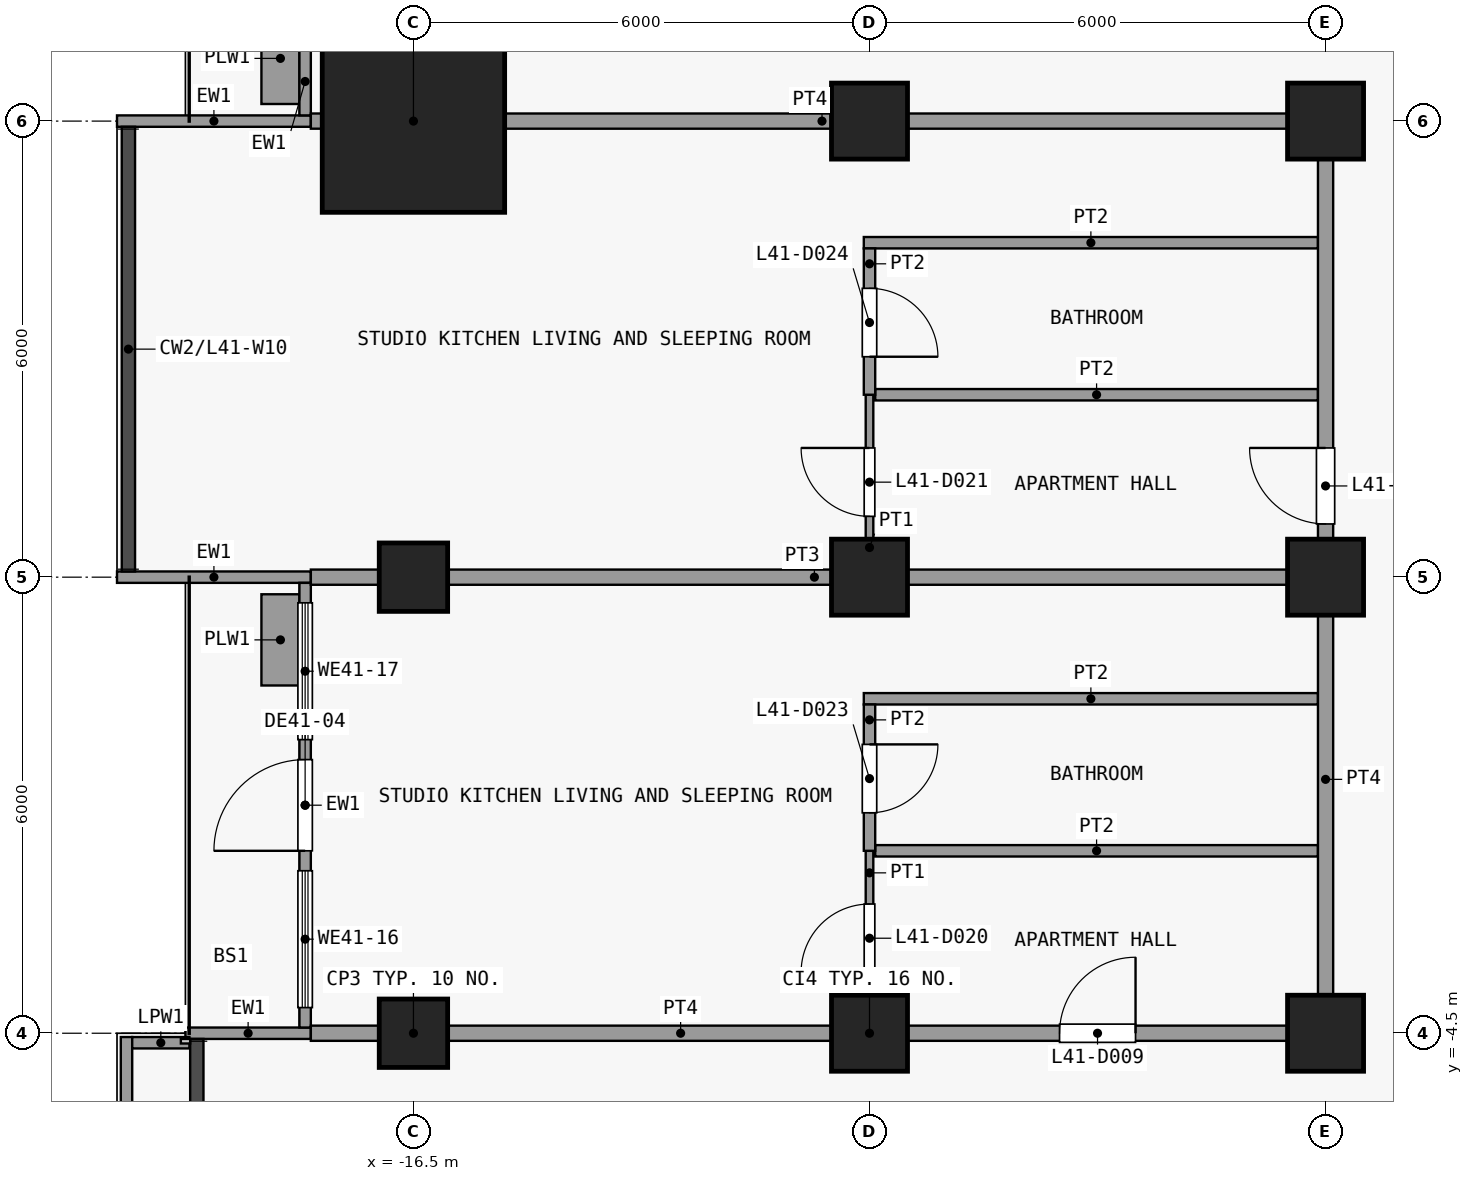
"""IFC4 building model, lengths in metres.
Left out: names, types, materials, properties, quantities, classifications, styles, units other than length and angle.
Written with IfcOpenShell. Run it as: python <this file> out.ifc"""

import sys

from ifc_helpers import new_model, si_unit, direction, frame, frame_2d, origin, origin_2d, place, context, subcontext, project, spatial, rectangle, extrude, element, fill, save


model = new_model("IFC4")
c1 = context("Model", 3, precision=1e-05, world=origin(), true_north=direction((0.0, 1.0)))
c2 = subcontext(c1, "Body", "Model", "MODEL_VIEW")
j1 = project(units=[si_unit("LENGTHUNIT", "METRE"), si_unit("PLANEANGLEUNIT", "RADIAN")], contexts=[c1])
p1 = place(None, origin())
s1 = spatial("IfcSite", under=j1, at=p1, CompositionType="ELEMENT")
p2 = place(p1, origin())
s2 = spatial("IfcBuilding", under=s1, at=p2, CompositionType="ELEMENT")
p3 = place(p2, frame((0.0, 0.0, 167.3)))
s3 = spatial("IfcBuildingStorey", under=s2, at=p3, CompositionType="ELEMENT", Elevation=167.3)
for number, where, z_axis, x_axis in (
    (1, (-16.5, -4.5, 0.0), (0.0, 0.0, 1.0), (1.0, 0.0, 0.0)),
    (2, (-16.5, 1.5, 0.0), (0.0, 0.0, 1.0), (1.0, 0.0, 0.0)),
):
    element("IfcColumn", number, at=place(p3, frame(where, z_axis=z_axis, x_axis=x_axis)), inside=s3, PredefinedType="COLUMN", context=c2, shape_type="SweptSolid", body=[
        extrude(rectangle(XDim=0.9, YDim=0.9, at=origin_2d()), origin(), (0.0, 0.0, 1.0), 3.6),
    ])
p4 = place(p3, frame((-16.5, 7.5, 0.0), z_axis=(0.0, 0.0, 1.0), x_axis=(1.0, 0.0, 0.0)))
e3 = element("IfcColumn", 3, at=p4, inside=s3, PredefinedType="COLUMN", context=c2, shape_type="SweptSolid", body=[
    extrude(rectangle(XDim=2.4, YDim=2.4, at=origin_2d()), origin(), (0.0, 0.0, 1.0), 3.6),
])
for number, where, z_axis, x_axis in (
    (4, (-10.5, -4.5, 0.0), (0.0, 0.0, 1.0), (1.0, 0.0, 0.0)),
    (5, (-10.5, 1.5, 0.0), (0.0, 0.0, 1.0), (1.0, 0.0, 0.0)),
    (6, (-10.5, 7.5, 0.0), (0.0, 0.0, 1.0), (1.0, 0.0, 0.0)),
    (7, (-4.5, -4.5, 0.0), (0.0, 0.0, 1.0), (1.0, 0.0, 0.0)),
    (8, (-4.5, 1.5, 0.0), (0.0, 0.0, 1.0), (1.0, 0.0, 0.0)),
    (9, (-4.5, 7.5, 0.0), (0.0, 0.0, 1.0), (1.0, 0.0, 0.0)),
):
    element("IfcColumn", number, at=place(p3, frame(where, z_axis=z_axis, x_axis=x_axis)), inside=s3, PredefinedType="COLUMN", context=c2, shape_type="SweptSolid", body=[
        extrude(rectangle(XDim=1.0, YDim=1.0, at=origin_2d()), origin(), (0.0, 0.0, 1.0), 3.6),
    ])
p5 = place(p3, frame((-17.85, -4.5, 0.0), z_axis=(0.0, 0.0, 1.0), x_axis=(-1.0, 0.0, 0.0)))
e10 = element("IfcWall", 10, at=p5, inside=s3, PredefinedType="SOLIDWALL", context=c2, shape_type="SweptSolid", body=[
    extrude(rectangle(XDim=1.65, YDim=0.15, at=frame_2d((0.825, 0.0))), origin(), (0.0, 0.0, 1.0), 3.3),
])
p6 = place(p3, frame((-17.85, 1.5, 0.0), z_axis=(0.0, 0.0, 1.0), x_axis=(-1.0, 0.0, 0.0)))
e11 = element("IfcWall", 11, at=p6, inside=s3, PredefinedType="SOLIDWALL", context=c2, shape_type="SweptSolid", body=[
    extrude(rectangle(XDim=2.55, YDim=0.15, at=frame_2d((1.275, 0.0))), origin(), (0.0, 0.0, 1.0), 3.3),
])
p7 = place(p3, frame((-17.925, -4.425, 0.0), z_axis=(0.0, 0.0, 1.0), x_axis=(0.0, 1.0, 0.0)))
e12 = element("IfcWall", 12, at=p7, inside=s3, PredefinedType="SOLIDWALL", context=c2, shape_type="SweptSolid", body=[
    extrude(rectangle(XDim=5.85, YDim=0.15, at=frame_2d((2.925, 0.0))), origin(), (0.0, 0.0, 1.0), 3.3),
])
p8 = place(p7, frame((2.325, 0.0, 0.0)))
e13 = element("IfcOpeningElement", 13, at=p8, cuts=e12, PredefinedType="OPENING", context=c2, shape_type="SweptSolid", body=[
    extrude(rectangle(XDim=1.2, YDim=2.4, at=frame_2d((0.6, 1.2))), frame((0.0, 0.085, 0.0), z_axis=(0.0, -1.0, 0.0), x_axis=(1.0, 0.0, 0.0)), (0.0, 0.0, 1.0), 0.17),
])
p9 = place(p7, frame((0.262, 0.0, 0.9)))
e14 = element("IfcOpeningElement", 14, at=p9, cuts=e12, PredefinedType="OPENING", context=c2, shape_type="SweptSolid", body=[
    extrude(rectangle(XDim=1.8, YDim=2.1, at=frame_2d((0.9, 1.05))), frame((0.0, 0.085, 0.0), z_axis=(0.0, -1.0, 0.0), x_axis=(1.0, 0.0, 0.0)), (0.0, 0.0, 1.0), 0.17),
])
p10 = place(p7, frame((3.788, 0.0, 0.9)))
e15 = element("IfcOpeningElement", 15, at=p10, cuts=e12, PredefinedType="OPENING", context=c2, shape_type="SweptSolid", body=[
    extrude(rectangle(XDim=1.8, YDim=2.1, at=frame_2d((0.9, 1.05))), frame((0.0, 0.085, 0.0), z_axis=(0.0, -1.0, 0.0), x_axis=(1.0, 0.0, 0.0)), (0.0, 0.0, 1.0), 0.17),
])
p11 = place(p3, frame((-18.25, 0.075, 0.0), z_axis=(0.0, 0.0, 1.0), x_axis=(0.0, 1.0, 0.0)))
e16 = element("IfcWall", 16, at=p11, inside=s3, PredefinedType="USERDEFINED", context=c2, shape_type="SweptSolid", body=[
    extrude(rectangle(XDim=1.2, YDim=0.5, at=frame_2d((0.6, 0.0))), origin(), (0.0, 0.0, 1.0), 0.9),
])
p12 = place(p3, frame((-17.85, 7.5, 0.0), z_axis=(0.0, 0.0, 1.0), x_axis=(-1.0, 0.0, 0.0)))
e17 = element("IfcWall", 17, at=p12, inside=s3, PredefinedType="SOLIDWALL", context=c2, shape_type="SweptSolid", body=[
    extrude(rectangle(XDim=2.55, YDim=0.15, at=frame_2d((1.275, 0.0))), origin(), (0.0, 0.0, 1.0), 3.3),
])
p13 = place(p3, frame((-17.925, 7.575, 0.0), z_axis=(0.0, 0.0, 1.0), x_axis=(0.0, 1.0, 0.0)))
e18 = element("IfcWall", 18, at=p13, inside=s3, PredefinedType="SOLIDWALL", context=c2, shape_type="SweptSolid", body=[
    extrude(rectangle(XDim=5.85, YDim=0.15, at=frame_2d((2.925, 0.0))), origin(), (0.0, 0.0, 1.0), 3.3),
])
p14 = place(p13, frame((3.825, 0.0, 0.0)))
e19 = element("IfcOpeningElement", 19, at=p14, cuts=e18, PredefinedType="OPENING", context=c2, shape_type="SweptSolid", body=[
    extrude(rectangle(XDim=1.2, YDim=2.4, at=frame_2d((0.6, 1.2))), frame((0.0, 0.085, 0.0), z_axis=(0.0, -1.0, 0.0), x_axis=(1.0, 0.0, 0.0)), (0.0, 0.0, 1.0), 0.17),
])
p15 = place(p13, frame((1.012, 0.0, 0.9)))
e20 = element("IfcOpeningElement", 20, at=p15, cuts=e18, PredefinedType="OPENING", context=c2, shape_type="SweptSolid", body=[
    extrude(rectangle(XDim=1.8, YDim=2.1, at=frame_2d((0.9, 1.05))), frame((0.0, 0.085, 0.0), z_axis=(0.0, -1.0, 0.0), x_axis=(1.0, 0.0, 0.0)), (0.0, 0.0, 1.0), 0.17),
])
p16 = place(p3, frame((-18.25, 7.725, 0.0), z_axis=(0.0, 0.0, 1.0), x_axis=(0.0, 1.0, 0.0)))
e21 = element("IfcWall", 21, at=p16, inside=s3, PredefinedType="USERDEFINED", context=c2, shape_type="SweptSolid", body=[
    extrude(rectangle(XDim=1.2, YDim=0.5, at=frame_2d((0.6, 0.0))), origin(), (0.0, 0.0, 1.0), 0.9),
])
p17 = place(p3, frame((-20.275, -13.3, 0.0), z_axis=(0.0, 0.0, 1.0), x_axis=(0.0, 1.0, 0.0)))
e22 = element("IfcWall", 22, at=p17, inside=s3, PredefinedType="PARAPET", context=c2, shape_type="SweptSolid", body=[
    extrude(rectangle(XDim=8.75, YDim=0.15, at=frame_2d((4.375, 0.0))), origin(), (0.0, 0.0, 1.0), 1.15),
])
p18 = place(p3, frame((-20.2, -4.625, 0.0), z_axis=(0.0, 0.0, 1.0), x_axis=(1.0, 0.0, 0.0)))
e23 = element("IfcWall", 23, at=p18, inside=s3, PredefinedType="PARAPET", context=c2, shape_type="SweptSolid", body=[
    extrude(rectangle(XDim=0.752, YDim=0.15, at=frame_2d((0.376, 0.0))), origin(), (0.0, 0.0, 1.0), 1.15),
])
p19 = place(p3, frame((-17.85, -4.5, 0.0), z_axis=(0.0, 0.0, 1.0), x_axis=(1.0, 0.0, 0.0)))
e24 = element("IfcWall", 24, at=p19, inside=s3, PredefinedType="PARTITIONING", context=c2, shape_type="SweptSolid", body=[
    extrude(rectangle(XDim=13.45, YDim=0.2, at=frame_2d((6.725, 0.0))), origin(), (0.0, 0.0, 1.0), 3.3),
])
p20 = place(p19, frame((9.85, 0.0, 0.0)))
e25 = element("IfcOpeningElement", 25, at=p20, cuts=e24, PredefinedType="OPENING", context=c2, shape_type="SweptSolid", body=[
    extrude(rectangle(XDim=1.0, YDim=2.1, at=frame_2d((0.5, 1.05))), frame((0.0, 0.11, 0.0), z_axis=(0.0, -1.0, 0.0), x_axis=(1.0, 0.0, 0.0)), (0.0, 0.0, 1.0), 0.22),
])
p21 = place(p3, frame((-10.425, -2.1, 0.0), z_axis=(0.0, 0.0, 1.0), x_axis=(1.0, 0.0, 0.0)))
e26 = element("IfcWall", 26, at=p21, inside=s3, PredefinedType="PARTITIONING", context=c2, shape_type="SweptSolid", body=[
    extrude(rectangle(XDim=5.825, YDim=0.15, at=frame_2d((2.913, 0.0))), origin(), (0.0, 0.0, 1.0), 3.3),
])
p22 = place(p3, frame((-10.575, -0.1, 0.0), z_axis=(0.0, 0.0, 1.0), x_axis=(1.0, 0.0, 0.0)))
e27 = element("IfcWall", 27, at=p22, inside=s3, PredefinedType="PARTITIONING", context=c2, shape_type="SweptSolid", body=[
    extrude(rectangle(XDim=5.975, YDim=0.15, at=frame_2d((2.987, 0.0))), origin(), (0.0, 0.0, 1.0), 3.3),
])
p23 = place(p3, frame((-17.85, 1.5, 0.0), z_axis=(0.0, 0.0, 1.0), x_axis=(1.0, 0.0, 0.0)))
e28 = element("IfcWall", 28, at=p23, inside=s3, PredefinedType="PARTITIONING", context=c2, shape_type="SweptSolid", body=[
    extrude(rectangle(XDim=13.25, YDim=0.2, at=frame_2d((6.625, 0.0))), origin(), (0.0, 0.0, 1.0), 3.3),
])
p24 = place(p3, frame((-10.425, 3.9, 0.0), z_axis=(0.0, 0.0, 1.0), x_axis=(1.0, 0.0, 0.0)))
e29 = element("IfcWall", 29, at=p24, inside=s3, PredefinedType="PARTITIONING", context=c2, shape_type="SweptSolid", body=[
    extrude(rectangle(XDim=5.825, YDim=0.15, at=frame_2d((2.913, 0.0))), origin(), (0.0, 0.0, 1.0), 3.3),
])
p25 = place(p3, frame((-10.575, 5.9, 0.0), z_axis=(0.0, 0.0, 1.0), x_axis=(1.0, 0.0, 0.0)))
e30 = element("IfcWall", 30, at=p25, inside=s3, PredefinedType="PARTITIONING", context=c2, shape_type="SweptSolid", body=[
    extrude(rectangle(XDim=5.975, YDim=0.15, at=frame_2d((2.987, 0.0))), origin(), (0.0, 0.0, 1.0), 3.3),
])
p26 = place(p3, frame((-17.85, 7.5, 0.0), z_axis=(0.0, 0.0, 1.0), x_axis=(1.0, 0.0, 0.0)))
e31 = element("IfcWall", 31, at=p26, inside=s3, PredefinedType="PARTITIONING", context=c2, shape_type="SweptSolid", body=[
    extrude(rectangle(XDim=13.45, YDim=0.2, at=frame_2d((6.725, 0.0))), origin(), (0.0, 0.0, 1.0), 3.3),
])
p27 = place(p3, frame((-10.5, -4.4, 0.0), z_axis=(0.0, 0.0, 1.0), x_axis=(0.0, 1.0, 0.0)))
e32 = element("IfcWall", 32, at=p27, inside=s3, PredefinedType="PARTITIONING", context=c2, shape_type="SweptSolid", body=[
    extrude(rectangle(XDim=2.3, YDim=0.1, at=frame_2d((1.15, 0.0))), origin(), (0.0, 0.0, 1.0), 3.3),
])
p28 = place(p27, frame((0.7, 0.0, 0.0)))
e33 = element("IfcOpeningElement", 33, at=p28, cuts=e32, PredefinedType="OPENING", context=c2, shape_type="SweptSolid", body=[
    extrude(rectangle(XDim=0.9, YDim=2.1, at=frame_2d((0.45, 1.05))), frame((0.0, 0.06, 0.0), z_axis=(0.0, -1.0, 0.0), x_axis=(1.0, 0.0, 0.0)), (0.0, 0.0, 1.0), 0.12),
])
p29 = place(p3, frame((-10.5, 1.6, 0.0), z_axis=(0.0, 0.0, 1.0), x_axis=(0.0, 1.0, 0.0)))
e34 = element("IfcWall", 34, at=p29, inside=s3, PredefinedType="PARTITIONING", context=c2, shape_type="SweptSolid", body=[
    extrude(rectangle(XDim=2.3, YDim=0.1, at=frame_2d((1.15, 0.0))), origin(), (0.0, 0.0, 1.0), 3.3),
])
p30 = place(p29, frame((0.7, 0.0, 0.0)))
e35 = element("IfcOpeningElement", 35, at=p30, cuts=e34, PredefinedType="OPENING", context=c2, shape_type="SweptSolid", body=[
    extrude(rectangle(XDim=0.9, YDim=2.1, at=frame_2d((0.45, 1.05))), frame((0.0, 0.06, 0.0), z_axis=(0.0, -1.0, 0.0), x_axis=(1.0, 0.0, 0.0)), (0.0, 0.0, 1.0), 0.12),
])
p31 = place(p3, frame((-10.5, -2.1, 0.0), z_axis=(0.0, 0.0, 1.0), x_axis=(0.0, 1.0, 0.0)))
e36 = element("IfcWall", 36, at=p31, inside=s3, PredefinedType="PARTITIONING", context=c2, shape_type="SweptSolid", body=[
    extrude(rectangle(XDim=1.925, YDim=0.15, at=frame_2d((0.962, 0.0))), origin(), (0.0, 0.0, 1.0), 3.3),
])
p32 = place(p31, frame((0.5, 0.0, 0.0)))
e37 = element("IfcOpeningElement", 37, at=p32, cuts=e36, PredefinedType="OPENING", context=c2, shape_type="SweptSolid", body=[
    extrude(rectangle(XDim=0.9, YDim=2.1, at=frame_2d((0.45, 1.05))), frame((0.0, 0.085, 0.0), z_axis=(0.0, -1.0, 0.0), x_axis=(1.0, 0.0, 0.0)), (0.0, 0.0, 1.0), 0.17),
])
p33 = place(p3, frame((-10.5, 3.9, 0.0), z_axis=(0.0, 0.0, 1.0), x_axis=(0.0, 1.0, 0.0)))
e38 = element("IfcWall", 38, at=p33, inside=s3, PredefinedType="PARTITIONING", context=c2, shape_type="SweptSolid", body=[
    extrude(rectangle(XDim=1.925, YDim=0.15, at=frame_2d((0.962, 0.0))), origin(), (0.0, 0.0, 1.0), 3.3),
])
p34 = place(p33, frame((0.5, 0.0, 0.0)))
e39 = element("IfcOpeningElement", 39, at=p34, cuts=e38, PredefinedType="OPENING", context=c2, shape_type="SweptSolid", body=[
    extrude(rectangle(XDim=0.9, YDim=2.1, at=frame_2d((0.45, 1.05))), frame((0.0, 0.085, 0.0), z_axis=(0.0, -1.0, 0.0), x_axis=(1.0, 0.0, 0.0)), (0.0, 0.0, 1.0), 0.17),
])
p35 = place(p3, frame((-4.5, -4.4, 0.0), z_axis=(0.0, 0.0, 1.0), x_axis=(0.0, 1.0, 0.0)))
e40 = element("IfcWall", 40, at=p35, inside=s3, PredefinedType="PARTITIONING", context=c2, shape_type="SweptSolid", body=[
    extrude(rectangle(XDim=11.8, YDim=0.2, at=frame_2d((5.9, 0.0))), origin(), (0.0, 0.0, 1.0), 3.3),
])
p36 = place(p35, frame((6.6, 0.0, 0.0)))
e41 = element("IfcOpeningElement", 41, at=p36, cuts=e40, PredefinedType="OPENING", context=c2, shape_type="SweptSolid", body=[
    extrude(rectangle(XDim=1.0, YDim=2.1, at=frame_2d((0.5, 1.05))), frame((0.0, 0.11, 0.0), z_axis=(0.0, -1.0, 0.0), x_axis=(1.0, 0.0, 0.0)), (0.0, 0.0, 1.0), 0.22),
])
p37 = place(p8, origin())
e42 = element("IfcDoor", 42, at=p37, inside=s3, OperationType="SINGLE_SWING_LEFT", PredefinedType="DOOR", context=c2, shape_type="SweptSolid", body=[
    extrude(rectangle(XDim=1.2, YDim=2.4, at=frame_2d((0.6, 1.2))), frame((0.0, 0.025, 0.0), z_axis=(0.0, -1.0, 0.0), x_axis=(1.0, 0.0, 0.0)), (0.0, 0.0, 1.0), 0.05),
])
fill(e13, e42)
p38 = place(p9, origin())
e43 = element("IfcWindow", 43, at=p38, inside=s3, PartitioningType="SINGLE_PANEL", PredefinedType="WINDOW", context=c2, shape_type="SweptSolid", body=[
    extrude(rectangle(XDim=1.8, YDim=2.1, at=frame_2d((0.9, 1.05))), frame((0.0, 0.03, 0.0), z_axis=(0.0, -1.0, 0.0), x_axis=(1.0, 0.0, 0.0)), (0.0, 0.0, 1.0), 0.06),
])
fill(e14, e43)
p39 = place(p10, origin())
e44 = element("IfcWindow", 44, at=p39, inside=s3, PartitioningType="SINGLE_PANEL", PredefinedType="WINDOW", context=c2, shape_type="SweptSolid", body=[
    extrude(rectangle(XDim=1.8, YDim=2.1, at=frame_2d((0.9, 1.05))), frame((0.0, 0.03, 0.0), z_axis=(0.0, -1.0, 0.0), x_axis=(1.0, 0.0, 0.0)), (0.0, 0.0, 1.0), 0.06),
])
fill(e15, e44)
p40 = place(p20, origin())
e45 = element("IfcDoor", 45, at=p40, inside=s3, OperationType="SINGLE_SWING_LEFT", PredefinedType="DOOR", context=c2, shape_type="SweptSolid", body=[
    extrude(rectangle(XDim=1.0, YDim=2.1, at=frame_2d((0.5, 1.05))), frame((0.0, 0.025, 0.0), z_axis=(0.0, -1.0, 0.0), x_axis=(1.0, 0.0, 0.0)), (0.0, 0.0, 1.0), 0.05),
])
fill(e25, e45)
p41 = place(p28, origin())
e46 = element("IfcDoor", 46, at=p41, inside=s3, OperationType="SINGLE_SWING_RIGHT", PredefinedType="DOOR", context=c2, shape_type="SweptSolid", body=[
    extrude(rectangle(XDim=0.9, YDim=2.1, at=frame_2d((0.45, 1.05))), frame((0.0, 0.025, 0.0), z_axis=(0.0, -1.0, 0.0), x_axis=(1.0, 0.0, 0.0)), (0.0, 0.0, 1.0), 0.05),
])
fill(e33, e46)
p42 = place(p30, origin())
e47 = element("IfcDoor", 47, at=p42, inside=s3, OperationType="SINGLE_SWING_LEFT", PredefinedType="DOOR", context=c2, shape_type="SweptSolid", body=[
    extrude(rectangle(XDim=0.9, YDim=2.1, at=frame_2d((0.45, 1.05))), frame((0.0, 0.025, 0.0), z_axis=(0.0, -1.0, 0.0), x_axis=(1.0, 0.0, 0.0)), (0.0, 0.0, 1.0), 0.05),
])
fill(e35, e47)
p43 = place(p32, origin())
e48 = element("IfcDoor", 48, at=p43, inside=s3, OperationType="SINGLE_SWING_RIGHT", PredefinedType="DOOR", context=c2, shape_type="SweptSolid", body=[
    extrude(rectangle(XDim=0.9, YDim=2.1, at=frame_2d((0.45, 1.05))), frame((0.0, 0.025, 0.0), z_axis=(0.0, -1.0, 0.0), x_axis=(1.0, 0.0, 0.0)), (0.0, 0.0, 1.0), 0.05),
])
fill(e37, e48)
p44 = place(p34, origin())
e49 = element("IfcDoor", 49, at=p44, inside=s3, OperationType="SINGLE_SWING_LEFT", PredefinedType="DOOR", context=c2, shape_type="SweptSolid", body=[
    extrude(rectangle(XDim=0.9, YDim=2.1, at=frame_2d((0.45, 1.05))), frame((0.0, 0.025, 0.0), z_axis=(0.0, -1.0, 0.0), x_axis=(1.0, 0.0, 0.0)), (0.0, 0.0, 1.0), 0.05),
])
fill(e39, e49)
p45 = place(p36, origin())
e50 = element("IfcDoor", 50, at=p45, inside=s3, OperationType="SINGLE_SWING_LEFT", PredefinedType="DOOR", context=c2, shape_type="SweptSolid", body=[
    extrude(rectangle(XDim=1.0, YDim=2.1, at=frame_2d((0.5, 1.05))), frame((0.0, 0.025, 0.0), z_axis=(0.0, -1.0, 0.0), x_axis=(1.0, 0.0, 0.0)), (0.0, 0.0, 1.0), 0.05),
])
fill(e41, e50)
save(model, sys.argv[1])
